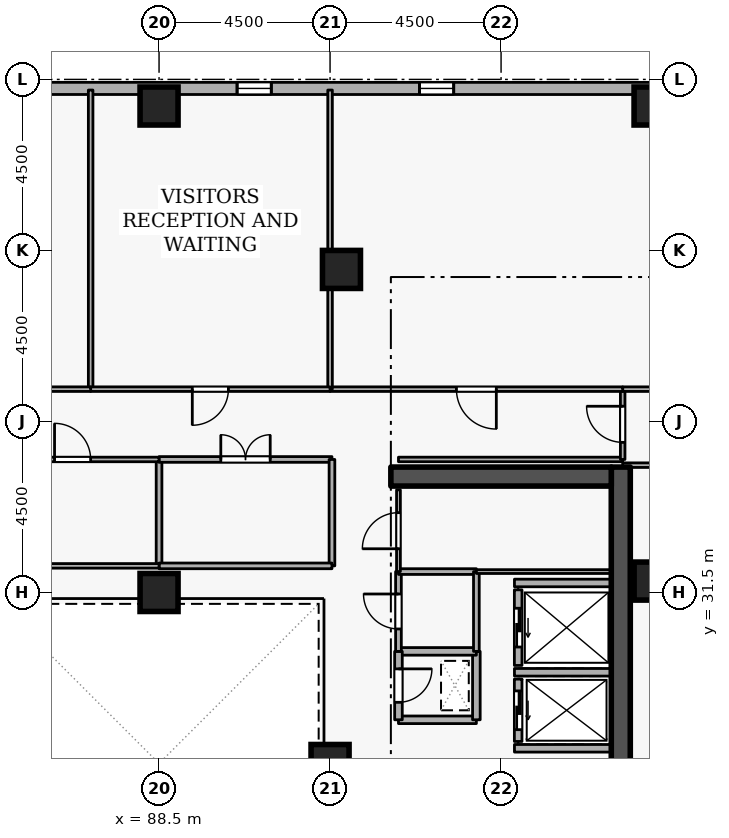
"""IFC4 building model, lengths in metres.
Left out: names, types, materials, properties, quantities, classifications, styles, units other than length and angle.
Written with IfcOpenShell. Run it as: python <this file> out.ifc"""

import sys

from ifc_helpers import new_model, si_unit, direction, frame, frame_2d, origin, origin_2d, place, context, subcontext, project, spatial, rectangle, extrude, element, fill, save


model = new_model("IFC4")
c1 = context("Model", 3, precision=1e-05, world=origin(), true_north=direction((0.0, 1.0)))
c2 = subcontext(c1, "Body", "Model", "MODEL_VIEW")
j1 = project(units=[si_unit("LENGTHUNIT", "METRE"), si_unit("PLANEANGLEUNIT", "RADIAN")], contexts=[c1])
p1 = place(None, origin())
s1 = spatial("IfcSite", under=j1, at=p1, CompositionType="ELEMENT")
p2 = place(p1, origin())
s2 = spatial("IfcBuilding", under=s1, at=p2, CompositionType="ELEMENT")
p3 = place(p2, frame((0.0, 0.0, 210.9)))
s3 = spatial("IfcBuildingStorey", under=s2, at=p3, CompositionType="ELEMENT", Elevation=210.9)
p4 = place(p3, frame((100.65, 19.2, 0.0), z_axis=(0.0, 0.0, 1.0), x_axis=(0.0, 1.0, 0.0)))
e1 = element("IfcWall", 1, at=p4, inside=s3, PredefinedType="SHEAR", context=c2, shape_type="SweptSolid", body=[
    extrude(rectangle(XDim=15.6, YDim=0.5, at=frame_2d((7.8, 0.0))), origin(), (0.0, 0.0, 1.0), 3.6),
])
p5 = place(p3, frame((94.6, 34.55, 0.0), z_axis=(0.0, 0.0, 1.0), x_axis=(1.0, 0.0, 0.0)))
e2 = element("IfcWall", 2, at=p5, inside=s3, PredefinedType="SHEAR", context=c2, shape_type="SweptSolid", body=[
    extrude(rectangle(XDim=5.8, YDim=0.5, at=frame_2d((2.9, 0.0))), origin(), (0.0, 0.0, 1.0), 3.6),
])
for number, where, z_axis, x_axis in (
    (3, (101.5, 44.3, 0.0), (0.0, 0.0, 1.0), (1.0, 0.0, 0.0)),
    (4, (88.5, 44.3, 0.0), (0.0, 0.0, 1.0), (1.0, 0.0, 0.0)),
    (5, (93.3, 40.0, 0.0), (0.0, 0.0, 1.0), (1.0, 0.0, 0.0)),
    (6, (101.5, 31.8, 0.0), (0.0, 0.0, 1.0), (1.0, 0.0, 0.0)),
    (7, (93.0, 27.0, 0.0), (0.0, 0.0, 1.0), (1.0, 0.0, 0.0)),
    (8, (88.5, 31.5, 0.0), (0.0, 0.0, 1.0), (1.0, 0.0, 0.0)),
):
    element("IfcColumn", number, at=place(p3, frame(where, z_axis=z_axis, x_axis=x_axis)), inside=s3, PredefinedType="COLUMN", context=c2, shape_type="SweptSolid", body=[
        extrude(rectangle(XDim=1.0, YDim=1.0, at=origin_2d()), origin(), (0.0, 0.0, 1.0), 3.6),
    ])
p6 = place(p3, frame((102.854, 44.762, 0.0), z_axis=(0.0, 0.0, 1.0), x_axis=(-0.999999997144, 7.5574884e-05, 0.0)))
e9 = element("IfcWall", 9, at=p6, inside=s3, PredefinedType="STANDARD", context=c2, shape_type="SweptSolid", body=[
    extrude(rectangle(XDim=35.535, YDim=0.32, at=frame_2d((17.768, 0.0))), origin(), (0.0, 0.0, 1.0), 2.7),
])
p7 = place(p6, frame((6.6, 0.0, 0.72)))
e10 = element("IfcOpeningElement", 10, at=p7, cuts=e9, PredefinedType="OPENING", context=c2, shape_type="SweptSolid", body=[
    extrude(rectangle(XDim=0.9, YDim=1.75, at=frame_2d((0.45, 0.875))), frame((0.0, 0.17, 0.0), z_axis=(0.0, -1.0, 0.0), x_axis=(1.0, 0.0, 0.0)), (0.0, 0.0, 1.0), 0.34),
])
p8 = place(p6, frame((11.4, 0.0, 0.72)))
e11 = element("IfcOpeningElement", 11, at=p8, cuts=e9, PredefinedType="OPENING", context=c2, shape_type="SweptSolid", body=[
    extrude(rectangle(XDim=0.9, YDim=1.75, at=frame_2d((0.45, 0.875))), frame((0.0, 0.17, 0.0), z_axis=(0.0, -1.0, 0.0), x_axis=(1.0, 0.0, 0.0)), (0.0, 0.0, 1.0), 0.34),
])
p9 = place(p6, frame((21.0, 0.0, 0.72)))
e12 = element("IfcOpeningElement", 12, at=p9, cuts=e9, PredefinedType="OPENING", context=c2, shape_type="SweptSolid", body=[
    extrude(rectangle(XDim=0.9, YDim=1.75, at=frame_2d((0.45, 0.875))), frame((0.0, 0.17, 0.0), z_axis=(0.0, -1.0, 0.0), x_axis=(1.0, 0.0, 0.0)), (0.0, 0.0, 1.0), 0.34),
])
p10 = place(p6, frame((30.6, 0.0, 0.72)))
e13 = element("IfcOpeningElement", 13, at=p10, cuts=e9, PredefinedType="OPENING", context=c2, shape_type="SweptSolid", body=[
    extrude(rectangle(XDim=0.9, YDim=1.75, at=frame_2d((0.45, 0.875))), frame((0.0, 0.17, 0.0), z_axis=(0.0, -1.0, 0.0), x_axis=(1.0, 0.0, 0.0)), (0.0, 0.0, 1.0), 0.34),
])
p11 = place(p3, frame((97.95, 29.22, 0.0), z_axis=(0.0, 0.0, 1.0), x_axis=(0.0, -1.0, 0.0)))
e14 = element("IfcWall", 14, at=p11, inside=s3, PredefinedType="STANDARD", context=c2, shape_type="SweptSolid", body=[
    extrude(rectangle(XDim=1.64, YDim=0.2, at=frame_2d((0.82, 0.0))), origin(), (0.0, 0.0, 1.0), 3.34),
])
p12 = place(p11, frame((0.31, 0.0, 0.0)))
e15 = element("IfcOpeningElement", 15, at=p12, cuts=e14, PredefinedType="OPENING", context=c2, shape_type="SweptSolid", body=[
    extrude(rectangle(XDim=1.02, YDim=2.06, at=frame_2d((0.51, 1.03))), frame((0.0, 0.11, 0.0), z_axis=(0.0, -1.0, 0.0), x_axis=(1.0, 0.0, 0.0)), (0.0, 0.0, 1.0), 0.22),
])
p13 = place(p3, frame((97.95, 31.57, 0.0), z_axis=(0.0, 0.0, 1.0), x_axis=(0.0, -1.0, 0.0)))
e16 = element("IfcWall", 16, at=p13, inside=s3, PredefinedType="STANDARD", context=c2, shape_type="SweptSolid", body=[
    extrude(rectangle(XDim=1.99, YDim=0.2, at=frame_2d((0.995, 0.0))), origin(), (0.0, 0.0, 1.0), 3.34),
])
p14 = place(p13, frame((0.485, 0.0, 0.0)))
e17 = element("IfcOpeningElement", 17, at=p14, cuts=e16, PredefinedType="OPENING", context=c2, shape_type="SweptSolid", body=[
    extrude(rectangle(XDim=1.02, YDim=2.06, at=frame_2d((0.51, 1.03))), frame((0.0, 0.11, 0.0), z_axis=(0.0, -1.0, 0.0), x_axis=(1.0, 0.0, 0.0)), (0.0, 0.0, 1.0), 0.22),
])
for number, where, z_axis, x_axis in (
    (18, (97.852, 29.4, 0.0), (0.0, 0.0, 1.0), (1.0, 0.0, 0.0)),
    (19, (97.852, 27.4, 0.0), (0.0, 0.0, 1.0), (1.0, 0.0, 0.0)),
    (20, (97.852, 31.75, 0.0), (0.0, 0.0, 1.0), (1.0, 0.0, 0.0)),
):
    element("IfcWall", number, at=place(p3, frame(where, z_axis=z_axis, x_axis=x_axis)), inside=s3, PredefinedType="STANDARD", context=c2, shape_type="SweptSolid", body=[
        extrude(rectangle(XDim=2.536, YDim=0.2, at=frame_2d((1.268, 0.0))), origin(), (0.0, 0.0, 1.0), 3.34),
    ])
p15 = place(p3, frame((94.8, 28.15, 0.0), z_axis=(0.0, 0.0, 1.0), x_axis=(1.0, 0.0, 0.0)))
e21 = element("IfcWall", 21, at=p15, inside=s3, PredefinedType="STANDARD", context=c2, shape_type="SweptSolid", body=[
    extrude(rectangle(XDim=2.05, YDim=0.2, at=frame_2d((1.025, 0.0))), origin(), (0.0, 0.0, 1.0), 3.34),
])
p16 = place(p3, frame((96.85, 28.15, 0.0), z_axis=(0.0, 0.0, 1.0), x_axis=(0.0, 1.0, 0.0)))
e22 = element("IfcWall", 22, at=p16, inside=s3, PredefinedType="STANDARD", context=c2, shape_type="SweptSolid", body=[
    extrude(rectangle(XDim=1.8, YDim=0.2, at=frame_2d((0.9, 0.0))), origin(), (0.0, 0.0, 1.0), 3.34),
])
p17 = place(p3, frame((96.85, 29.95, 0.0), z_axis=(0.0, 0.0, 1.0), x_axis=(-1.0, 0.0, 0.0)))
e23 = element("IfcWall", 23, at=p17, inside=s3, PredefinedType="STANDARD", context=c2, shape_type="SweptSolid", body=[
    extrude(rectangle(XDim=2.05, YDim=0.2, at=frame_2d((1.025, 0.0))), origin(), (0.0, 0.0, 1.0), 3.34),
])
p18 = place(p3, frame((94.8, 29.95, 0.0), z_axis=(0.0, 0.0, 1.0), x_axis=(0.0, -1.0, 0.0)))
e24 = element("IfcWall", 24, at=p18, inside=s3, PredefinedType="STANDARD", context=c2, shape_type="SweptSolid", body=[
    extrude(rectangle(XDim=1.8, YDim=0.2, at=frame_2d((0.9, 0.0))), origin(), (0.0, 0.0, 1.0), 3.34),
])
p19 = place(p18, frame((0.46, 0.0, 0.0)))
e25 = element("IfcOpeningElement", 25, at=p19, cuts=e24, PredefinedType="OPENING", context=c2, shape_type="SweptSolid", body=[
    extrude(rectangle(XDim=0.88, YDim=2.04, at=frame_2d((0.44, 1.02))), frame((0.0, 0.11, 0.0), z_axis=(0.0, -1.0, 0.0), x_axis=(1.0, 0.0, 0.0)), (0.0, 0.0, 1.0), 0.22),
])
p20 = place(p3, frame((94.8, 29.95, 0.0), z_axis=(0.0, 0.0, 1.0), x_axis=(0.0, 1.0, 0.0)))
e26 = element("IfcWall", 26, at=p20, inside=s3, PredefinedType="PARTITIONING", context=c2, shape_type="SweptSolid", body=[
    extrude(rectangle(XDim=2.1, YDim=0.15, at=frame_2d((1.05, 0.0))), origin(), (0.0, 0.0, 1.0), 3.34),
])
p21 = place(p20, frame((0.59, 0.0, 0.0)))
e27 = element("IfcOpeningElement", 27, at=p21, cuts=e26, PredefinedType="OPENING", context=c2, shape_type="SweptSolid", body=[
    extrude(rectangle(XDim=0.92, YDim=2.08, at=frame_2d((0.46, 1.04))), frame((0.0, 0.085, 0.0), z_axis=(0.0, -1.0, 0.0), x_axis=(1.0, 0.0, 0.0)), (0.0, 0.0, 1.0), 0.17),
])
p22 = place(p3, frame((94.8, 32.05, 0.0), z_axis=(0.0, 0.0, 1.0), x_axis=(1.0, 0.0, 0.0)))
e28 = element("IfcWall", 28, at=p22, inside=s3, PredefinedType="PARTITIONING", context=c2, shape_type="SweptSolid", body=[
    extrude(rectangle(XDim=2.05, YDim=0.15, at=frame_2d((1.025, 0.0))), origin(), (0.0, 0.0, 1.0), 3.34),
])
p23 = place(p3, frame((96.85, 32.05, 0.0), z_axis=(0.0, 0.0, 1.0), x_axis=(0.0, -1.0, 0.0)))
e29 = element("IfcWall", 29, at=p23, inside=s3, PredefinedType="PARTITIONING", context=c2, shape_type="SweptSolid", body=[
    extrude(rectangle(XDim=2.1, YDim=0.15, at=frame_2d((1.05, 0.0))), origin(), (0.0, 0.0, 1.0), 3.34),
])
p24 = place(p3, frame((94.8, 32.05, 0.0), z_axis=(0.0, 0.0, 1.0), x_axis=(0.0, 1.0, 0.0)))
e30 = element("IfcWall", 30, at=p24, inside=s3, PredefinedType="PARTITIONING", context=c2, shape_type="SweptSolid", body=[
    extrude(rectangle(XDim=2.15, YDim=0.1, at=frame_2d((1.075, 0.0))), origin(), (0.0, 0.0, 1.0), 3.34),
])
p25 = place(p24, frame((0.6, 0.0, 0.0)))
e31 = element("IfcOpeningElement", 31, at=p25, cuts=e30, PredefinedType="OPENING", context=c2, shape_type="SweptSolid", body=[
    extrude(rectangle(XDim=0.95, YDim=2.1, at=frame_2d((0.475, 1.05))), frame((0.0, 0.06, 0.0), z_axis=(0.0, -1.0, 0.0), x_axis=(1.0, 0.0, 0.0)), (0.0, 0.0, 1.0), 0.12),
])
p26 = place(p3, frame((100.4, 32.05, 0.0), z_axis=(0.0, 0.0, 1.0), x_axis=(-1.0, 0.0, 0.0)))
e32 = element("IfcWall", 32, at=p26, inside=s3, PredefinedType="PARTITIONING", context=c2, shape_type="SweptSolid", body=[
    extrude(rectangle(XDim=3.55, YDim=0.1, at=frame_2d((1.775, 0.0))), origin(), (0.0, 0.0, 1.0), 3.34),
])
p27 = place(p3, frame((94.8, 35.0, 0.0), z_axis=(0.0, 0.0, 1.0), x_axis=(1.0, 0.0, 0.0)))
e33 = element("IfcWall", 33, at=p27, inside=s3, PredefinedType="PARTITIONING", context=c2, shape_type="SweptSolid", body=[
    extrude(rectangle(XDim=5.9, YDim=0.12, at=frame_2d((2.95, 0.0))), origin(), (0.0, 0.0, 1.0), 3.34),
])
p28 = place(p3, frame((100.7, 35.0, 0.0), z_axis=(0.0, 0.0, 1.0), x_axis=(0.0, 1.0, 0.0)))
e34 = element("IfcWall", 34, at=p28, inside=s3, PredefinedType="PARTITIONING", context=c2, shape_type="SweptSolid", body=[
    extrude(rectangle(XDim=1.85, YDim=0.12, at=frame_2d((0.925, 0.0))), origin(), (0.0, 0.0, 1.0), 3.34),
])
p29 = place(p28, frame((0.45, 0.0, 0.0)))
e35 = element("IfcOpeningElement", 35, at=p29, cuts=e34, PredefinedType="OPENING", context=c2, shape_type="SweptSolid", body=[
    extrude(rectangle(XDim=0.95, YDim=2.1, at=frame_2d((0.475, 1.05))), frame((0.0, 0.07, 0.0), z_axis=(0.0, -1.0, 0.0), x_axis=(1.0, 0.0, 0.0)), (0.0, 0.0, 1.0), 0.14),
])
for number, where, z_axis, x_axis in (
    (36, (100.7, 36.85, 0.0), (0.0, 0.0, 1.0), (1.0, 0.0, 0.0)),
    (37, (106.22, 34.85, 0.0), (0.0, 0.0, 1.0), (-1.0, 0.0, 0.0)),
):
    element("IfcWall", number, at=place(p3, frame(where, z_axis=z_axis, x_axis=x_axis)), inside=s3, PredefinedType="PARTITIONING", context=c2, shape_type="SweptSolid", body=[
        extrude(rectangle(XDim=5.52, YDim=0.12, at=frame_2d((2.76, 0.0))), origin(), (0.0, 0.0, 1.0), 3.34),
    ])
p30 = place(p3, frame((100.7, 36.85, 0.0), z_axis=(0.0, 0.0, 1.0), x_axis=(-1.0, 0.0, 0.0)))
e38 = element("IfcWall", 38, at=p30, inside=s3, PredefinedType="PARTITIONING", context=c2, shape_type="SweptSolid", body=[
    extrude(rectangle(XDim=7.7, YDim=0.12, at=frame_2d((3.85, 0.0))), origin(), (0.0, 0.0, 1.0), 3.34),
])
p31 = place(p30, frame((3.325, 0.0, 0.0)))
e39 = element("IfcOpeningElement", 39, at=p31, cuts=e38, PredefinedType="OPENING", context=c2, shape_type="SweptSolid", body=[
    extrude(rectangle(XDim=1.05, YDim=2.1, at=frame_2d((0.525, 1.05))), frame((0.0, 0.07, 0.0), z_axis=(0.0, -1.0, 0.0), x_axis=(1.0, 0.0, 0.0)), (0.0, 0.0, 1.0), 0.14),
])
for number, where, z_axis, x_axis in (
    (40, (93.0, 36.85, 0.0), (0.0, 0.0, 1.0), (0.0, 1.0, 0.0)),
    (41, (86.7, 36.85, 0.0), (0.0, 0.0, 1.0), (0.0, 1.0, 0.0)),
):
    element("IfcWall", number, at=place(p3, frame(where, z_axis=z_axis, x_axis=x_axis)), inside=s3, PredefinedType="PARTITIONING", context=c2, shape_type="SweptSolid", body=[
        extrude(rectangle(XDim=7.87, YDim=0.12, at=frame_2d((3.935, 0.0))), origin(), (0.0, 0.0, 1.0), 3.34),
    ])
p32 = place(p3, frame((93.0, 36.85, 0.0), z_axis=(0.0, 0.0, 1.0), x_axis=(-1.0, 0.0, 0.0)))
e42 = element("IfcWall", 42, at=p32, inside=s3, PredefinedType="PARTITIONING", context=c2, shape_type="SweptSolid", body=[
    extrude(rectangle(XDim=6.3, YDim=0.12, at=frame_2d((3.15, 0.0))), origin(), (0.0, 0.0, 1.0), 3.34),
])
p33 = place(p32, frame((2.675, 0.0, 0.0)))
e43 = element("IfcOpeningElement", 43, at=p33, cuts=e42, PredefinedType="OPENING", context=c2, shape_type="SweptSolid", body=[
    extrude(rectangle(XDim=0.95, YDim=2.1, at=frame_2d((0.475, 1.05))), frame((0.0, 0.07, 0.0), z_axis=(0.0, -1.0, 0.0), x_axis=(1.0, 0.0, 0.0)), (0.0, 0.0, 1.0), 0.14),
])
p34 = place(p3, frame((86.7, 36.85, 0.0), z_axis=(0.0, 0.0, 1.0), x_axis=(-1.0, 0.0, 0.0)))
e44 = element("IfcWall", 44, at=p34, inside=s3, PredefinedType="PARTITIONING", context=c2, shape_type="SweptSolid", body=[
    extrude(rectangle(XDim=4.5, YDim=0.12, at=frame_2d((2.25, 0.0))), origin(), (0.0, 0.0, 1.0), 3.34),
])
p35 = place(p34, frame((1.725, 0.0, 0.0)))
e45 = element("IfcOpeningElement", 45, at=p35, cuts=e44, PredefinedType="OPENING", context=c2, shape_type="SweptSolid", body=[
    extrude(rectangle(XDim=1.05, YDim=2.1, at=frame_2d((0.525, 1.05))), frame((0.0, 0.07, 0.0), z_axis=(0.0, -1.0, 0.0), x_axis=(1.0, 0.0, 0.0)), (0.0, 0.0, 1.0), 0.14),
])
p36 = place(p3, frame((88.5, 32.2, 0.0), z_axis=(0.0, 0.0, 1.0), x_axis=(0.0, 1.0, 0.0)))
e46 = element("IfcWall", 46, at=p36, inside=s3, PredefinedType="PARTITIONING", context=c2, shape_type="SweptSolid", body=[
    extrude(rectangle(XDim=2.8, YDim=0.15, at=frame_2d((1.4, 0.0))), origin(), (0.0, 0.0, 1.0), 2.878),
])
p37 = place(p3, frame((88.5, 35.0, 0.0), z_axis=(0.0, 0.0, 1.0), x_axis=(1.0, 0.0, 0.0)))
e47 = element("IfcWall", 47, at=p37, inside=s3, PredefinedType="PARTITIONING", context=c2, shape_type="SweptSolid", body=[
    extrude(rectangle(XDim=4.55, YDim=0.15, at=frame_2d((2.275, 0.0))), origin(), (0.0, 0.0, 1.0), 3.34),
])
p38 = place(p37, frame((1.625, 0.0, 0.0)))
e48 = element("IfcOpeningElement", 48, at=p38, cuts=e47, PredefinedType="OPENING", context=c2, shape_type="SweptSolid", body=[
    extrude(rectangle(XDim=1.3, YDim=2.12, at=frame_2d((0.65, 1.06))), frame((0.0, 0.085, 0.0), z_axis=(0.0, -1.0, 0.0), x_axis=(1.0, 0.0, 0.0)), (0.0, 0.0, 1.0), 0.17),
])
p39 = place(p3, frame((93.05, 35.0, 0.0), z_axis=(0.0, 0.0, 1.0), x_axis=(0.0, -1.0, 0.0)))
e49 = element("IfcWall", 49, at=p39, inside=s3, PredefinedType="PARTITIONING", context=c2, shape_type="SweptSolid", body=[
    extrude(rectangle(XDim=2.8, YDim=0.15, at=frame_2d((1.4, 0.0))), origin(), (0.0, 0.0, 1.0), 3.34),
])
p40 = place(p3, frame((93.05, 32.2, 0.0), z_axis=(0.0, 0.0, 1.0), x_axis=(-1.0, 0.0, 0.0)))
e50 = element("IfcWall", 50, at=p40, inside=s3, PredefinedType="PARTITIONING", context=c2, shape_type="SweptSolid", body=[
    extrude(rectangle(XDim=4.55, YDim=0.15, at=frame_2d((2.275, 0.0))), origin(), (0.0, 0.0, 1.0), 3.34),
])
p41 = place(p3, frame((83.95, 35.0, 0.0), z_axis=(0.0, 0.0, 1.0), x_axis=(1.0, 0.0, 0.0)))
e51 = element("IfcWall", 51, at=p41, inside=s3, PredefinedType="PARTITIONING", context=c2, shape_type="SweptSolid", body=[
    extrude(rectangle(XDim=4.55, YDim=0.12, at=frame_2d((2.275, 0.0))), origin(), (0.0, 0.0, 1.0), 3.34),
])
p42 = place(p41, frame((1.8, 0.0, 0.0)))
e52 = element("IfcOpeningElement", 52, at=p42, cuts=e51, PredefinedType="OPENING", context=c2, shape_type="SweptSolid", body=[
    extrude(rectangle(XDim=0.95, YDim=2.1, at=frame_2d((0.475, 1.05))), frame((0.0, 0.07, 0.0), z_axis=(0.0, -1.0, 0.0), x_axis=(1.0, 0.0, 0.0)), (0.0, 0.0, 1.0), 0.14),
])
p43 = place(p3, frame((88.5, 32.2, 0.0), z_axis=(0.0, 0.0, 1.0), x_axis=(-1.0, 0.0, 0.0)))
e53 = element("IfcWall", 53, at=p43, inside=s3, PredefinedType="PARTITIONING", context=c2, shape_type="SweptSolid", body=[
    extrude(rectangle(XDim=4.55, YDim=0.12, at=frame_2d((2.275, 0.0))), origin(), (0.0, 0.0, 1.0), 3.34),
])
p44 = place(p7, origin())
e54 = element("IfcWindow", 54, at=p44, inside=s3, PartitioningType="SINGLE_PANEL", PredefinedType="WINDOW", context=c2, shape_type="SweptSolid", body=[
    extrude(rectangle(XDim=0.9, YDim=1.75, at=frame_2d((0.45, 0.875))), frame((0.0, 0.03, 0.0), z_axis=(0.0, -1.0, 0.0), x_axis=(1.0, 0.0, 0.0)), (0.0, 0.0, 1.0), 0.06),
])
fill(e10, e54)
p45 = place(p8, origin())
e55 = element("IfcWindow", 55, at=p45, inside=s3, PartitioningType="SINGLE_PANEL", PredefinedType="WINDOW", context=c2, shape_type="SweptSolid", body=[
    extrude(rectangle(XDim=0.9, YDim=1.75, at=frame_2d((0.45, 0.875))), frame((0.0, 0.03, 0.0), z_axis=(0.0, -1.0, 0.0), x_axis=(1.0, 0.0, 0.0)), (0.0, 0.0, 1.0), 0.06),
])
fill(e11, e55)
p46 = place(p12, origin())
e56 = element("IfcDoor", 56, at=p46, inside=s3, OperationType="SLIDING_TO_LEFT", PredefinedType="DOOR", context=c2, shape_type="SweptSolid", body=[
    extrude(rectangle(XDim=1.02, YDim=2.06, at=frame_2d((0.51, 1.03))), frame((0.0, 0.025, 0.0), z_axis=(0.0, -1.0, 0.0), x_axis=(1.0, 0.0, 0.0)), (0.0, 0.0, 1.0), 0.05),
])
fill(e15, e56)
p47 = place(p14, origin())
e57 = element("IfcDoor", 57, at=p47, inside=s3, OperationType="SLIDING_TO_LEFT", PredefinedType="DOOR", context=c2, shape_type="SweptSolid", body=[
    extrude(rectangle(XDim=1.02, YDim=2.06, at=frame_2d((0.51, 1.03))), frame((0.0, 0.025, 0.0), z_axis=(0.0, -1.0, 0.0), x_axis=(1.0, 0.0, 0.0)), (0.0, 0.0, 1.0), 0.05),
])
fill(e17, e57)
p48 = place(p19, origin())
e58 = element("IfcDoor", 58, at=p48, inside=s3, OperationType="SINGLE_SWING_LEFT", PredefinedType="DOOR", context=c2, shape_type="SweptSolid", body=[
    extrude(rectangle(XDim=0.88, YDim=2.04, at=frame_2d((0.44, 1.02))), frame((0.0, 0.025, 0.0), z_axis=(0.0, -1.0, 0.0), x_axis=(1.0, 0.0, 0.0)), (0.0, 0.0, 1.0), 0.05),
])
fill(e25, e58)
p49 = place(p21, origin())
e59 = element("IfcDoor", 59, at=p49, inside=s3, OperationType="SINGLE_SWING_RIGHT", PredefinedType="DOOR", context=c2, shape_type="SweptSolid", body=[
    extrude(rectangle(XDim=0.92, YDim=2.08, at=frame_2d((0.46, 1.04))), frame((0.0, 0.025, 0.0), z_axis=(0.0, -1.0, 0.0), x_axis=(1.0, 0.0, 0.0)), (0.0, 0.0, 1.0), 0.05),
])
fill(e27, e59)
p50 = place(p25, origin())
e60 = element("IfcDoor", 60, at=p50, inside=s3, OperationType="SINGLE_SWING_LEFT", PredefinedType="DOOR", context=c2, shape_type="SweptSolid", body=[
    extrude(rectangle(XDim=0.95, YDim=2.1, at=frame_2d((0.475, 1.05))), frame((0.0, 0.025, 0.0), z_axis=(0.0, -1.0, 0.0), x_axis=(1.0, 0.0, 0.0)), (0.0, 0.0, 1.0), 0.05),
])
fill(e31, e60)
p51 = place(p29, origin())
e61 = element("IfcDoor", 61, at=p51, inside=s3, OperationType="SINGLE_SWING_RIGHT", PredefinedType="DOOR", context=c2, shape_type="SweptSolid", body=[
    extrude(rectangle(XDim=0.95, YDim=2.1, at=frame_2d((0.475, 1.05))), frame((0.0, 0.025, 0.0), z_axis=(0.0, -1.0, 0.0), x_axis=(1.0, 0.0, 0.0)), (0.0, 0.0, 1.0), 0.05),
])
fill(e35, e61)
p52 = place(p31, origin())
e62 = element("IfcDoor", 62, at=p52, inside=s3, OperationType="SINGLE_SWING_LEFT", PredefinedType="DOOR", context=c2, shape_type="SweptSolid", body=[
    extrude(rectangle(XDim=1.05, YDim=2.1, at=frame_2d((0.525, 1.05))), frame((0.0, 0.025, 0.0), z_axis=(0.0, -1.0, 0.0), x_axis=(1.0, 0.0, 0.0)), (0.0, 0.0, 1.0), 0.05),
])
fill(e39, e62)
p53 = place(p33, origin())
e63 = element("IfcDoor", 63, at=p53, inside=s3, OperationType="SINGLE_SWING_RIGHT", PredefinedType="DOOR", context=c2, shape_type="SweptSolid", body=[
    extrude(rectangle(XDim=0.95, YDim=2.1, at=frame_2d((0.475, 1.05))), frame((0.0, 0.025, 0.0), z_axis=(0.0, -1.0, 0.0), x_axis=(1.0, 0.0, 0.0)), (0.0, 0.0, 1.0), 0.05),
])
fill(e43, e63)
p54 = place(p38, origin())
e64 = element("IfcDoor", 64, at=p54, inside=s3, OperationType="DOUBLE_DOOR_SINGLE_SWING", PredefinedType="DOOR", context=c2, shape_type="SweptSolid", body=[
    extrude(rectangle(XDim=1.3, YDim=2.12, at=frame_2d((0.65, 1.06))), frame((0.0, 0.025, 0.0), z_axis=(0.0, -1.0, 0.0), x_axis=(1.0, 0.0, 0.0)), (0.0, 0.0, 1.0), 0.05),
])
fill(e48, e64)
p55 = place(p42, origin())
e65 = element("IfcDoor", 65, at=p55, inside=s3, OperationType="SINGLE_SWING_LEFT", PredefinedType="DOOR", context=c2, shape_type="SweptSolid", body=[
    extrude(rectangle(XDim=0.95, YDim=2.1, at=frame_2d((0.475, 1.05))), frame((0.0, 0.025, 0.0), z_axis=(0.0, -1.0, 0.0), x_axis=(1.0, 0.0, 0.0)), (0.0, 0.0, 1.0), 0.05),
])
fill(e52, e65)
save(model, sys.argv[1])
